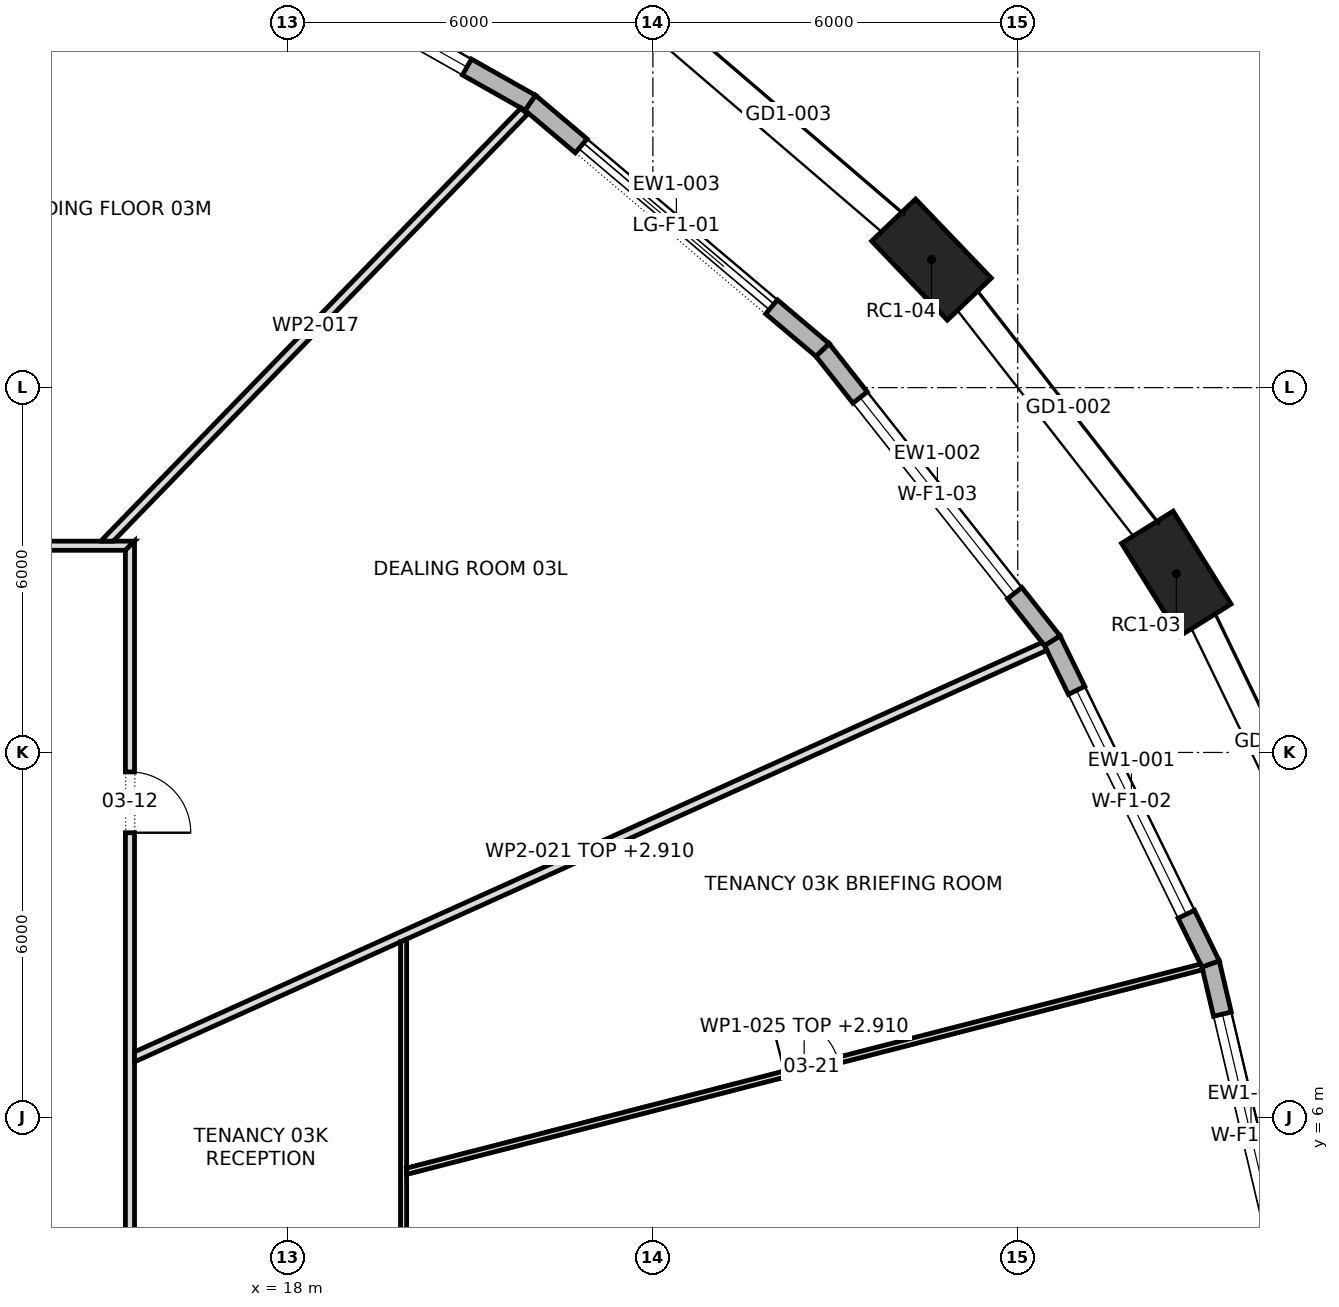
"""IFC4 building model, lengths in metres.
Left out: names, types, materials, properties, quantities, classifications, styles, units other than length and angle.
Written with IfcOpenShell. Run it as: python <this file> out.ifc"""

import sys

from ifc_helpers import new_model, si_unit, direction, frame, frame_2d, origin, origin_2d, place, context, subcontext, project, spatial, polyline, rectangle, outline, extrude, element, fill, save


model = new_model("IFC4")
c1 = context("Model", 3, precision=1e-05, world=origin(), true_north=direction((0.0, 1.0)))
c2 = subcontext(c1, "Body", "Model", "MODEL_VIEW")
j1 = project(units=[si_unit("LENGTHUNIT", "METRE"), si_unit("PLANEANGLEUNIT", "RADIAN")], contexts=[c1])
p1 = place(None, origin())
s1 = spatial("IfcSite", under=j1, at=p1, CompositionType="ELEMENT")
p2 = place(p1, origin())
s2 = spatial("IfcBuilding", under=s1, at=p2, CompositionType="ELEMENT")
p3 = place(p2, frame((0.0, 0.0, 57.1)))
s3 = spatial("IfcBuildingStorey", under=s2, at=p3, CompositionType="ELEMENT", Elevation=57.1)
for number, where, z_axis, x_axis in (
    (1, (32.608, 14.939, 0.0), (0.0, 0.0, 1.0), (-0.529, 0.849, 0.0)),
    (2, (28.581, 20.105, 0.0), (0.0, 0.0, 1.0), (-0.692, 0.722, 0.0)),
):
    element("IfcColumn", number, at=place(p3, frame(where, z_axis=z_axis, x_axis=x_axis)), inside=s3, PredefinedType="COLUMN", context=c2, shape_type="SweptSolid", body=[
        extrude(rectangle(XDim=1.8, YDim=1.0, at=origin_2d()), origin(), (0.0, 0.0, 1.0), 4.2),
    ])
p4 = place(p3, frame((34.5, 2.878, 0.0), z_axis=(0.0, 0.0, 1.0), x_axis=(-0.228990053972, 0.973428762253, 0.0)))
e3 = element("IfcWall", 3, at=p4, inside=s3, PredefinedType="STANDARD", context=c2, shape_type="SweptSolid", body=[
    extrude(outline(polyline([(-0.017, -0.15), (5.816, -0.15), (5.782, 0.15), (0.017, 0.15), (-0.017, -0.15)])), origin(), (0.0, 0.0, 1.0), 3.9),
])
p5 = place(p4, frame((0.849, 0.0, 0.6)))
e4 = element("IfcOpeningElement", 4, at=p5, cuts=e3, PredefinedType="OPENING", context=c2, shape_type="SweptSolid", body=[
    extrude(rectangle(XDim=4.1, YDim=2.85, at=frame_2d((2.05, 1.425))), frame((0.0, 0.162, 0.0), z_axis=(0.0, -1.0, 0.0), x_axis=(1.0, 0.0, 0.0)), (0.0, 0.0, 1.0), 0.324),
])
p6 = place(p3, frame((33.172, 8.523, 0.0), z_axis=(0.0, 0.0, 1.0), x_axis=(-0.439906146647, 0.898043752911, 0.0)))
e5 = element("IfcWall", 5, at=p6, inside=s3, PredefinedType="STANDARD", context=c2, shape_type="SweptSolid", body=[
    extrude(outline(polyline([(-0.017, -0.15), (5.935, -0.15), (5.903, 0.15), (0.017, 0.15), (-0.017, -0.15)])), origin(), (0.0, 0.0, 1.0), 3.9),
])
p7 = place(p6, frame((0.909, 0.0, 0.6)))
e6 = element("IfcOpeningElement", 6, at=p7, cuts=e5, PredefinedType="OPENING", context=c2, shape_type="SweptSolid", body=[
    extrude(rectangle(XDim=4.1, YDim=2.85, at=frame_2d((2.05, 1.425))), frame((0.0, 0.162, 0.0), z_axis=(0.0, -1.0, 0.0), x_axis=(1.0, 0.0, 0.0)), (0.0, 0.0, 1.0), 0.324),
])
p8 = place(p3, frame((30.568, 13.838, 0.0), z_axis=(0.0, 0.0, 1.0), x_axis=(-0.619993638342, 0.78460683684, 0.0)))
e7 = element("IfcWall", 7, at=p8, inside=s3, PredefinedType="STANDARD", context=c2, shape_type="SweptSolid", body=[
    extrude(outline(polyline([(-0.016, -0.15), (6.109, -0.15), (6.079, 0.15), (0.016, 0.15), (-0.016, -0.15)])), origin(), (0.0, 0.0, 1.0), 3.9),
])
p9 = place(p8, frame((0.997, 0.0, 0.6)))
e8 = element("IfcOpeningElement", 8, at=p9, cuts=e7, PredefinedType="OPENING", context=c2, shape_type="SweptSolid", body=[
    extrude(rectangle(XDim=4.1, YDim=2.85, at=frame_2d((2.05, 1.425))), frame((0.0, 0.162, 0.0), z_axis=(0.0, -1.0, 0.0), x_axis=(1.0, 0.0, 0.0)), (0.0, 0.0, 1.0), 0.324),
])
p10 = place(p3, frame((26.79, 18.62, 0.0), z_axis=(0.0, 0.0, 1.0), x_axis=(-0.763614259808, 0.645672720671, 0.0)))
e9 = element("IfcWall", 9, at=p10, inside=s3, PredefinedType="STANDARD", context=c2, shape_type="SweptSolid", body=[
    extrude(outline(polyline([(-0.015, -0.15), (6.309, -0.15), (6.281, 0.15), (0.015, 0.15), (-0.015, -0.15)])), origin(), (0.0, 0.0, 1.0), 3.9),
])
p11 = place(p10, frame((1.097, 0.0, 0.0)))
e10 = element("IfcOpeningElement", 10, at=p11, cuts=e9, PredefinedType="OPENING", context=c2, shape_type="SweptSolid", body=[
    extrude(rectangle(XDim=4.1, YDim=3.45, at=frame_2d((2.05, 1.725))), frame((0.0, 0.162, 0.0), z_axis=(0.0, -1.0, 0.0), x_axis=(1.0, 0.0, 0.0)), (0.0, 0.0, 1.0), 0.324),
])
p12 = place(p3, frame((21.983, 22.684, 0.0), z_axis=(0.0, 0.0, 1.0), x_axis=(-0.870647609977, 0.491907246584, 0.0)))
e11 = element("IfcWall", 11, at=p12, inside=s3, PredefinedType="STANDARD", context=c2, shape_type="SweptSolid", body=[
    extrude(outline(polyline([(-0.014, -0.15), (6.503, -0.15), (6.476, 0.15), (0.014, 0.15), (-0.014, -0.15)])), origin(), (0.0, 0.0, 1.0), 3.9),
])
p13 = place(p12, frame((1.195, 0.0, 0.6)))
e12 = element("IfcOpeningElement", 12, at=p13, cuts=e11, PredefinedType="OPENING", context=c2, shape_type="SweptSolid", body=[
    extrude(rectangle(XDim=4.1, YDim=2.85, at=frame_2d((2.05, 1.425))), frame((0.0, 0.162, 0.0), z_axis=(0.0, -1.0, 0.0), x_axis=(1.0, 0.0, 0.0)), (0.0, 0.0, 1.0), 0.324),
])
p14 = place(p3, frame((-15.475, 15.4, 0.0), z_axis=(0.0, 0.0, 1.0), x_axis=(1.0, 0.0, 0.0)))
e13 = element("IfcWall", 13, at=p14, inside=s3, PredefinedType="PARTITIONING", context=c2, shape_type="SweptSolid", body=[
    extrude(outline(polyline([(0.15, -0.075), (2.066, -0.075), (3.981, -0.075), (5.897, -0.075), (7.812, -0.075), (9.728, -0.075), (11.644, -0.075), (13.56, -0.075), (15.475, -0.075), (17.391, -0.075), (19.306, -0.075), (21.222, -0.075), (23.138, -0.075), (25.053, -0.075), (26.969, -0.075), (28.885, -0.075), (30.8, -0.075), (30.95, 0.075), (29.016, 0.075), (27.081, 0.075), (25.147, 0.075), (23.212, 0.075), (21.278, 0.075), (19.344, 0.075), (17.409, 0.075), (15.475, 0.075), (13.541, 0.075), (11.606, 0.075), (9.672, 0.075), (7.738, 0.075), (5.803, 0.075), (3.869, 0.075), (1.935, 0.075), (0.0, 0.075), (0.15, -0.075)])), origin(), (0.0, 0.0, 1.0), 3.9),
])
p15 = place(p14, frame((16.84, 0.0, 0.0)))
e14 = element("IfcOpeningElement", 14, at=p15, cuts=e13, PredefinedType="OPENING", context=c2, shape_type="SweptSolid", body=[
    extrude(rectangle(XDim=1.0, YDim=2.1, at=frame_2d((0.5, 1.05))), frame((0.0, 0.087, 0.0), z_axis=(0.0, -1.0, 0.0), x_axis=(1.0, 0.0, 0.0)), (0.0, 0.0, 1.0), 0.174),
])
p16 = place(p14, frame((9.215, 0.0, 0.0)))
e15 = element("IfcOpeningElement", 15, at=p16, cuts=e13, PredefinedType="OPENING", context=c2, shape_type="SweptSolid", body=[
    extrude(rectangle(XDim=1.0, YDim=2.1, at=frame_2d((0.5, 1.05))), frame((0.0, 0.087, 0.0), z_axis=(0.0, -1.0, 0.0), x_axis=(1.0, 0.0, 0.0)), (0.0, 0.0, 1.0), 0.174),
])
p17 = place(p14, frame((25.21, 0.0, 0.0)))
e16 = element("IfcOpeningElement", 16, at=p17, cuts=e13, PredefinedType="OPENING", context=c2, shape_type="SweptSolid", body=[
    extrude(rectangle(XDim=1.0, YDim=2.1, at=frame_2d((0.5, 1.05))), frame((0.0, 0.087, 0.0), z_axis=(0.0, -1.0, 0.0), x_axis=(1.0, 0.0, 0.0)), (0.0, 0.0, 1.0), 0.174),
])
p18 = place(p3, frame((14.972, 15.423, 0.0), z_axis=(0.0, 0.0, 1.0), x_axis=(0.696324469813, 0.717727129722, 0.0)))
e17 = element("IfcWall", 17, at=p18, inside=s3, PredefinedType="PARTITIONING", context=c2, shape_type="SweptSolid", body=[
    extrude(outline(polyline([(0.0, 0.075), (0.0, 0.074), (0.145, -0.075), (2.101, -0.075), (4.057, -0.075), (6.012, -0.075), (7.968, -0.075), (9.924, -0.075), (9.924, 0.075), (7.939, 0.075), (5.954, 0.075), (3.97, 0.075), (1.985, 0.075), (0.0, 0.075)])), origin(), (0.0, 0.0, 1.0), 3.9),
])
p19 = place(p3, frame((15.4, -15.475, 0.0), z_axis=(0.0, 0.0, 1.0), x_axis=(0.0, 1.0, 0.0)))
e18 = element("IfcWall", 18, at=p19, inside=s3, PredefinedType="PARTITIONING", context=c2, shape_type="SweptSolid", body=[
    extrude(outline(polyline([(0.0, -0.075), (1.935, -0.075), (3.869, -0.075), (5.803, -0.075), (7.738, -0.075), (9.672, -0.075), (11.606, -0.075), (13.541, -0.075), (15.475, -0.075), (17.409, -0.075), (19.344, -0.075), (21.278, -0.075), (23.212, -0.075), (25.147, -0.075), (27.081, -0.075), (29.016, -0.075), (30.95, -0.075), (30.8, 0.075), (28.885, 0.075), (26.969, 0.075), (25.053, 0.075), (23.138, 0.075), (21.222, 0.075), (19.306, 0.075), (17.391, 0.075), (15.475, 0.075), (13.56, 0.075), (11.644, 0.075), (9.728, 0.075), (7.812, 0.075), (5.897, 0.075), (3.981, 0.075), (2.066, 0.075), (0.15, 0.075), (0.0, -0.075)])), origin(), (0.0, 0.0, 1.0), 3.9),
])
p20 = place(p19, frame((8.99, 0.0, 0.0)))
e19 = element("IfcOpeningElement", 19, at=p20, cuts=e18, PredefinedType="OPENING", context=c2, shape_type="SweptSolid", body=[
    extrude(rectangle(XDim=1.0, YDim=2.1, at=frame_2d((0.5, 1.05))), frame((0.0, 0.087, 0.0), z_axis=(0.0, -1.0, 0.0), x_axis=(1.0, 0.0, 0.0)), (0.0, 0.0, 1.0), 0.174),
])
p21 = place(p19, frame((17.815, 0.0, 0.0)))
e20 = element("IfcOpeningElement", 20, at=p21, cuts=e18, PredefinedType="OPENING", context=c2, shape_type="SweptSolid", body=[
    extrude(rectangle(XDim=1.0, YDim=2.1, at=frame_2d((0.5, 1.05))), frame((0.0, 0.087, 0.0), z_axis=(0.0, -1.0, 0.0), x_axis=(1.0, 0.0, 0.0)), (0.0, 0.0, 1.0), 0.174),
])
p22 = place(p19, frame((26.155, 0.0, 0.0)))
e21 = element("IfcOpeningElement", 21, at=p22, cuts=e18, PredefinedType="OPENING", context=c2, shape_type="SweptSolid", body=[
    extrude(rectangle(XDim=1.0, YDim=2.1, at=frame_2d((0.5, 1.05))), frame((0.0, 0.087, 0.0), z_axis=(0.0, -1.0, 0.0), x_axis=(1.0, 0.0, 0.0)), (0.0, 0.0, 1.0), 0.174),
])
p23 = place(p3, frame((15.444, 6.98, 0.0), z_axis=(0.0, 0.0, 1.0), x_axis=(0.911545333682, 0.411199592221, 0.0)))
e22 = element("IfcWall", 22, at=p23, inside=s3, PredefinedType="PARTITIONING", context=c2, shape_type="SweptSolid", body=[
    extrude(outline(polyline([(0.0, -0.075), (1.6, -0.075), (3.2, -0.075), (4.8, -0.075), (4.801, -0.073), (4.805, -0.075), (6.747, -0.075), (8.69, -0.075), (10.632, -0.075), (12.574, -0.075), (14.517, -0.075), (16.459, -0.075), (16.459, -0.072), (16.457, 0.012), (16.441, 0.075), (14.622, 0.075), (12.802, 0.075), (10.983, 0.075), (9.164, 0.075), (7.345, 0.075), (5.525, 0.075), (3.706, 0.075), (1.887, 0.075), (0.068, 0.075), (0.0, -0.075)])), origin(), (0.0, 0.0, 1.0), 2.91),
])
p24 = place(p3, frame((19.9, -1.585, 0.0), z_axis=(0.0, 0.0, 1.0), x_axis=(0.0, 1.0, 0.0)))
e23 = element("IfcWall", 23, at=p24, inside=s3, PredefinedType="PARTITIONING", context=c2, shape_type="SweptSolid", body=[
    extrude(outline(polyline([(0.0, -0.05), (1.686, -0.05), (3.371, -0.05), (5.056, -0.05), (6.742, -0.05), (6.749, -0.048), (6.75, -0.05), (8.632, -0.05), (10.515, -0.05), (10.515, -0.049), (10.47, 0.05), (8.726, 0.05), (6.983, 0.05), (5.239, 0.05), (3.495, 0.05), (1.752, 0.05), (0.008, 0.05), (0.0, -0.046), (0.0, -0.05)])), origin(), (0.0, 0.0, 1.0), 3.9),
])
p25 = place(p24, frame((2.855, 0.0, 0.0)))
e24 = element("IfcOpeningElement", 24, at=p25, cuts=e23, PredefinedType="OPENING", context=c2, shape_type="SweptSolid", body=[
    extrude(rectangle(XDim=0.9, YDim=2.1, at=frame_2d((0.45, 1.05))), frame((0.0, 0.062, 0.0), z_axis=(0.0, -1.0, 0.0), x_axis=(1.0, 0.0, 0.0)), (0.0, 0.0, 1.0), 0.124),
])
p26 = place(p3, frame((19.938, 5.11, 0.0), z_axis=(0.0, 0.0, 1.0), x_axis=(0.968505877435, 0.248990693348, 0.0)))
e25 = element("IfcWall", 25, at=p26, inside=s3, PredefinedType="PARTITIONING", context=c2, shape_type="SweptSolid", body=[
    extrude(outline(polyline([(13.515, -0.05), (13.515, 0.003), (13.506, 0.05), (11.58, 0.05), (9.654, 0.05), (7.729, 0.05), (5.803, 0.05), (3.877, 0.05), (1.951, 0.05), (0.026, 0.05), (0.0, -0.049), (0.0, -0.05), (1.931, -0.05), (3.862, -0.05), (5.792, -0.05), (7.723, -0.05), (9.654, -0.05), (11.585, -0.05), (13.515, -0.05)])), origin(), (0.0, 0.0, 1.0), 2.91),
])
p27 = place(p26, frame((6.439, 0.0, 0.0)))
e26 = element("IfcOpeningElement", 26, at=p27, cuts=e25, PredefinedType="OPENING", context=c2, shape_type="SweptSolid", body=[
    extrude(rectangle(XDim=0.9, YDim=2.1, at=frame_2d((0.45, 1.05))), frame((0.0, 0.062, 0.0), z_axis=(0.0, -1.0, 0.0), x_axis=(1.0, 0.0, 0.0)), (0.0, 0.0, 1.0), 0.124),
])
p28 = place(p5, origin())
e27 = element("IfcWindow", 27, at=p28, inside=s3, PartitioningType="TRIPLE_PANEL_VERTICAL", PredefinedType="WINDOW", context=c2, shape_type="SweptSolid", body=[
    extrude(rectangle(XDim=4.1, YDim=2.85, at=frame_2d((2.05, 1.425))), frame((0.0, 0.03, 0.0), z_axis=(0.0, -1.0, 0.0), x_axis=(1.0, 0.0, 0.0)), (0.0, 0.0, 1.0), 0.06),
])
fill(e4, e27)
p29 = place(p7, origin())
e28 = element("IfcWindow", 28, at=p29, inside=s3, PartitioningType="TRIPLE_PANEL_VERTICAL", PredefinedType="WINDOW", context=c2, shape_type="SweptSolid", body=[
    extrude(rectangle(XDim=4.1, YDim=2.85, at=frame_2d((2.05, 1.425))), frame((0.0, 0.03, 0.0), z_axis=(0.0, -1.0, 0.0), x_axis=(1.0, 0.0, 0.0)), (0.0, 0.0, 1.0), 0.06),
])
fill(e6, e28)
p30 = place(p9, origin())
e29 = element("IfcWindow", 29, at=p30, inside=s3, PartitioningType="TRIPLE_PANEL_VERTICAL", PredefinedType="WINDOW", context=c2, shape_type="SweptSolid", body=[
    extrude(rectangle(XDim=4.1, YDim=2.85, at=frame_2d((2.05, 1.425))), frame((0.0, 0.03, 0.0), z_axis=(0.0, -1.0, 0.0), x_axis=(1.0, 0.0, 0.0)), (0.0, 0.0, 1.0), 0.06),
])
fill(e8, e29)
p31 = place(p11, origin())
e30 = element("IfcDoor", 30, at=p31, inside=s3, OperationType="DOUBLE_DOOR_SLIDING", PredefinedType="DOOR", context=c2, shape_type="SweptSolid", body=[
    extrude(rectangle(XDim=4.1, YDim=3.45, at=frame_2d((2.05, 1.725))), frame((0.0, 0.025, 0.0), z_axis=(0.0, -1.0, 0.0), x_axis=(1.0, 0.0, 0.0)), (0.0, 0.0, 1.0), 0.05),
])
fill(e10, e30)
p32 = place(p13, origin())
e31 = element("IfcWindow", 31, at=p32, inside=s3, PartitioningType="TRIPLE_PANEL_VERTICAL", PredefinedType="WINDOW", context=c2, shape_type="SweptSolid", body=[
    extrude(rectangle(XDim=4.1, YDim=2.85, at=frame_2d((2.05, 1.425))), frame((0.0, 0.03, 0.0), z_axis=(0.0, -1.0, 0.0), x_axis=(1.0, 0.0, 0.0)), (0.0, 0.0, 1.0), 0.06),
])
fill(e12, e31)
p33 = place(p22, frame((1.0, 0.0, 0.0), z_axis=(0.0, 0.0, 1.0), x_axis=(-1.0, 0.0, 0.0)))
e32 = element("IfcDoor", 32, at=p33, inside=s3, OperationType="SINGLE_SWING_LEFT", PredefinedType="DOOR", context=c2, shape_type="SweptSolid", body=[
    extrude(rectangle(XDim=1.0, YDim=2.1, at=frame_2d((0.5, 1.05))), frame((0.0, 0.025, 0.0), z_axis=(0.0, -1.0, 0.0), x_axis=(1.0, 0.0, 0.0)), (0.0, 0.0, 1.0), 0.05),
])
fill(e21, e32)
p34 = place(p27, origin())
e33 = element("IfcDoor", 33, at=p34, inside=s3, OperationType="SINGLE_SWING_RIGHT", PredefinedType="DOOR", context=c2, shape_type="SweptSolid", body=[
    extrude(rectangle(XDim=0.9, YDim=2.1, at=frame_2d((0.45, 1.05))), frame((0.0, 0.025, 0.0), z_axis=(0.0, -1.0, 0.0), x_axis=(1.0, 0.0, 0.0)), (0.0, 0.0, 1.0), 0.05),
])
fill(e26, e33)
save(model, sys.argv[1])
